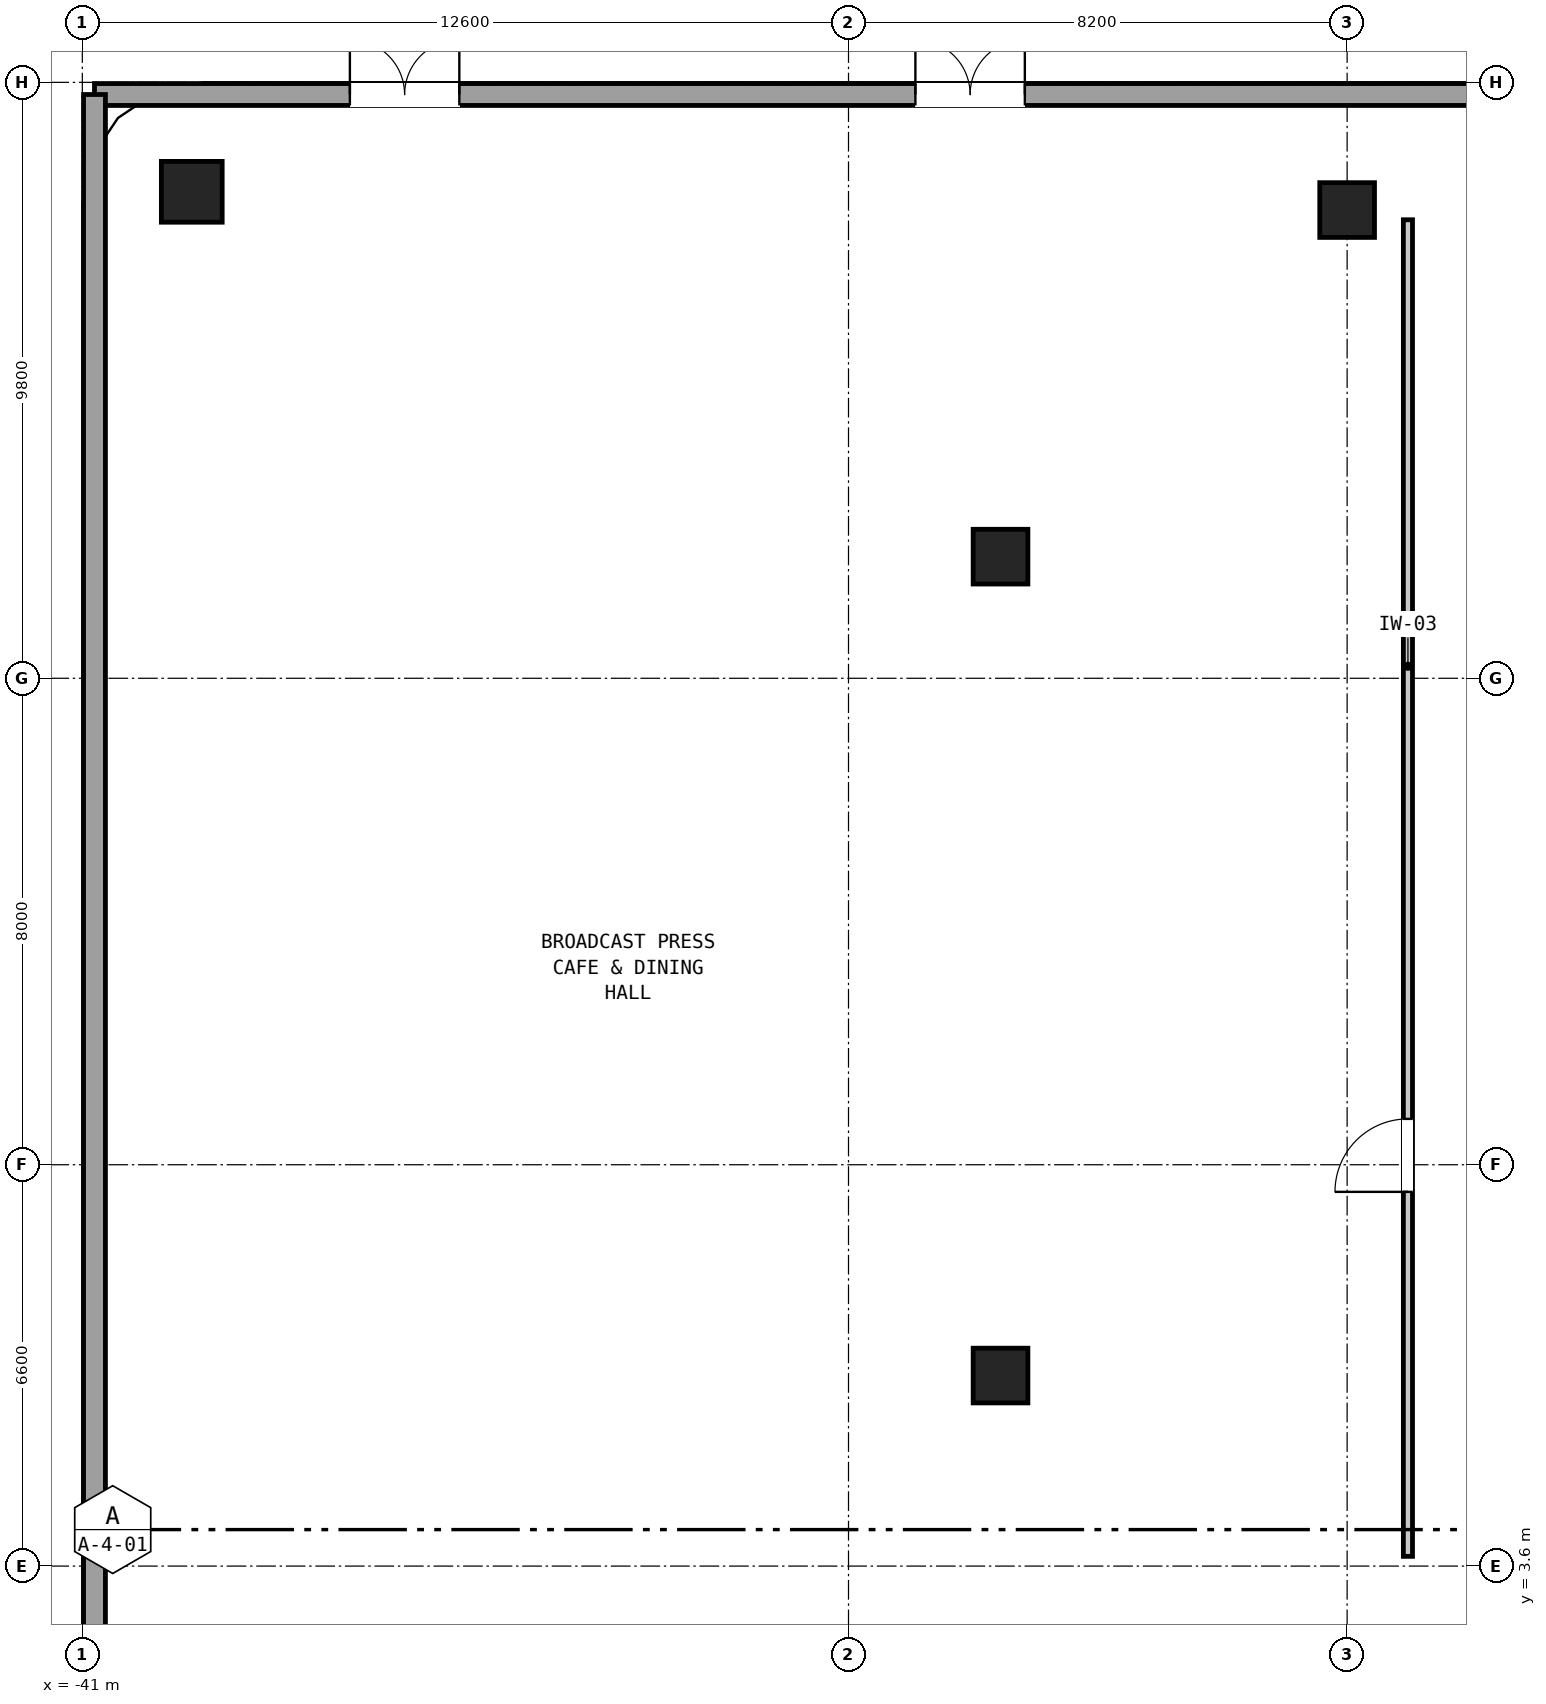
"""IFC4 building model, lengths in metres.
Left out: names, types, materials, properties, quantities, classifications, styles, units other than length and angle.
Written with IfcOpenShell. Run it as: python <this file> out.ifc"""

import sys

from ifc_helpers import new_model, si_unit, direction, frame, frame_2d, origin, origin_2d, place, context, subcontext, project, spatial, rectangle, hollow_rectangle, extrude, element, fill, save


model = new_model("IFC4")
c1 = context("Model", 3, precision=1e-05, world=origin(), true_north=direction((0.0, 1.0)))
c2 = subcontext(c1, "Body", "Model", "MODEL_VIEW")
j1 = project(units=[si_unit("LENGTHUNIT", "METRE"), si_unit("PLANEANGLEUNIT", "RADIAN")], contexts=[c1])
p1 = place(None, origin())
s1 = spatial("IfcSite", under=j1, at=p1, CompositionType="ELEMENT")
p2 = place(p1, origin())
s2 = spatial("IfcBuilding", under=s1, at=p2, CompositionType="ELEMENT")
p3 = place(p2, origin())
s3 = spatial("IfcBuildingStorey", under=s2, at=p3, CompositionType="ELEMENT", Elevation=0.0)
for number, where, z_axis, x_axis in (
    (1, (-20.2, 25.9, 0.0), (0.0, 0.0, 1.0), (1.0, 0.0, 0.0)),
    (2, (-25.9, 20.2, 0.0), (0.0, 0.0, 1.0), (0.0, 1.0, 0.0)),
    (3, (-25.9, 6.733, 0.0), (0.0, 0.0, 1.0), (0.0, 1.0, 0.0)),
):
    element("IfcColumn", number, at=place(p3, frame(where, z_axis=z_axis, x_axis=x_axis)), inside=s3, PredefinedType="COLUMN", context=c2, shape_type="SweptSolid", body=[
        extrude(hollow_rectangle(XDim=0.9, YDim=0.9, WallThickness=0.055, at=origin_2d()), origin(), (0.0, 0.0, 1.0), 5.1),
    ])
p4 = place(p3, frame((-39.2, 26.2, 0.0), z_axis=(0.0, 0.0, 1.0), x_axis=(1.0, 0.0, 0.0)))
e4 = element("IfcColumn", 4, at=p4, inside=s3, PredefinedType="COLUMN", context=c2, shape_type="SweptSolid", body=[
    extrude(rectangle(XDim=1.0, YDim=1.0, at=origin_2d()), origin(), (0.0, 0.0, 1.0), 5.1),
])
p5 = place(p3, frame((-40.8, 27.8, 0.0), z_axis=(0.0, 0.0, 1.0), x_axis=(1.0, 0.0, 0.0)))
e5 = element("IfcWall", 5, at=p5, inside=s3, PredefinedType="SOLIDWALL", context=c2, shape_type="SweptSolid", body=[
    extrude(rectangle(XDim=30.96, YDim=0.36, at=frame_2d((15.48, 0.0))), origin(), (0.0, 0.0, 1.0), 4.78),
])
p6 = place(p5, frame((4.2, 0.0, 0.0)))
e6 = element("IfcOpeningElement", 6, at=p6, cuts=e5, PredefinedType="OPENING", context=c2, shape_type="SweptSolid", body=[
    extrude(rectangle(XDim=1.8, YDim=2.4, at=frame_2d((0.9, 1.2))), frame((0.0, 0.192, 0.0), z_axis=(0.0, -1.0, 0.0), x_axis=(1.0, 0.0, 0.0)), (0.0, 0.0, 1.0), 0.384),
])
p7 = place(p5, frame((13.5, 0.0, 0.0)))
e7 = element("IfcOpeningElement", 7, at=p7, cuts=e5, PredefinedType="OPENING", context=c2, shape_type="SweptSolid", body=[
    extrude(rectangle(XDim=1.8, YDim=2.25, at=frame_2d((0.9, 1.125))), frame((0.0, 0.192, 0.0), z_axis=(0.0, -1.0, 0.0), x_axis=(1.0, 0.0, 0.0)), (0.0, 0.0, 1.0), 0.384),
])
p8 = place(p3, frame((-40.8, 0.0, 0.0), z_axis=(0.0, 0.0, 1.0), x_axis=(0.0, 1.0, 0.0)))
e8 = element("IfcWall", 8, at=p8, inside=s3, PredefinedType="SOLIDWALL", context=c2, shape_type="SweptSolid", body=[
    extrude(rectangle(XDim=27.8, YDim=0.36, at=frame_2d((13.9, 0.0))), origin(), (0.0, 0.0, 1.0), 4.78),
])
p9 = place(p3, frame((-19.2, 3.76, 0.0), z_axis=(0.0, 0.0, 1.0), x_axis=(0.0, 1.0, 0.0)))
e9 = element("IfcWall", 9, at=p9, inside=s3, PredefinedType="PARTITIONING", context=c2, shape_type="SweptSolid", body=[
    extrude(rectangle(XDim=21.98, YDim=0.15, at=frame_2d((10.99, 0.0))), origin(), (0.0, 0.0, 1.0), 4.78),
])
p10 = place(p9, frame((5.994, 0.0, 0.0)))
e10 = element("IfcOpeningElement", 10, at=p10, cuts=e9, PredefinedType="OPENING", context=c2, shape_type="SweptSolid", body=[
    extrude(rectangle(XDim=1.2, YDim=2.1, at=frame_2d((0.6, 1.05))), frame((0.0, 0.087, 0.0), z_axis=(0.0, -1.0, 0.0), x_axis=(1.0, 0.0, 0.0)), (0.0, 0.0, 1.0), 0.174),
])
p11 = place(p6, origin())
e11 = element("IfcDoor", 11, at=p11, inside=s3, OperationType="DOUBLE_DOOR_SINGLE_SWING", PredefinedType="DOOR", context=c2, shape_type="SweptSolid", body=[
    extrude(rectangle(XDim=1.8, YDim=2.4, at=frame_2d((0.9, 1.2))), frame((0.0, 0.025, 0.0), z_axis=(0.0, -1.0, 0.0), x_axis=(1.0, 0.0, 0.0)), (0.0, 0.0, 1.0), 0.05),
])
fill(e6, e11)
p12 = place(p7, origin())
e12 = element("IfcDoor", 12, at=p12, inside=s3, OperationType="DOUBLE_DOOR_SINGLE_SWING", PredefinedType="DOOR", context=c2, shape_type="SweptSolid", body=[
    extrude(rectangle(XDim=1.8, YDim=2.25, at=frame_2d((0.9, 1.125))), frame((0.0, 0.025, 0.0), z_axis=(0.0, -1.0, 0.0), x_axis=(1.0, 0.0, 0.0)), (0.0, 0.0, 1.0), 0.05),
])
fill(e7, e12)
p13 = place(p10, origin())
e13 = element("IfcDoor", 13, at=p13, inside=s3, OperationType="SINGLE_SWING_LEFT", PredefinedType="DOOR", context=c2, shape_type="SweptSolid", body=[
    extrude(rectangle(XDim=1.2, YDim=2.1, at=frame_2d((0.6, 1.05))), frame((0.0, 0.025, 0.0), z_axis=(0.0, -1.0, 0.0), x_axis=(1.0, 0.0, 0.0)), (0.0, 0.0, 1.0), 0.05),
])
fill(e10, e13)
save(model, sys.argv[1])
